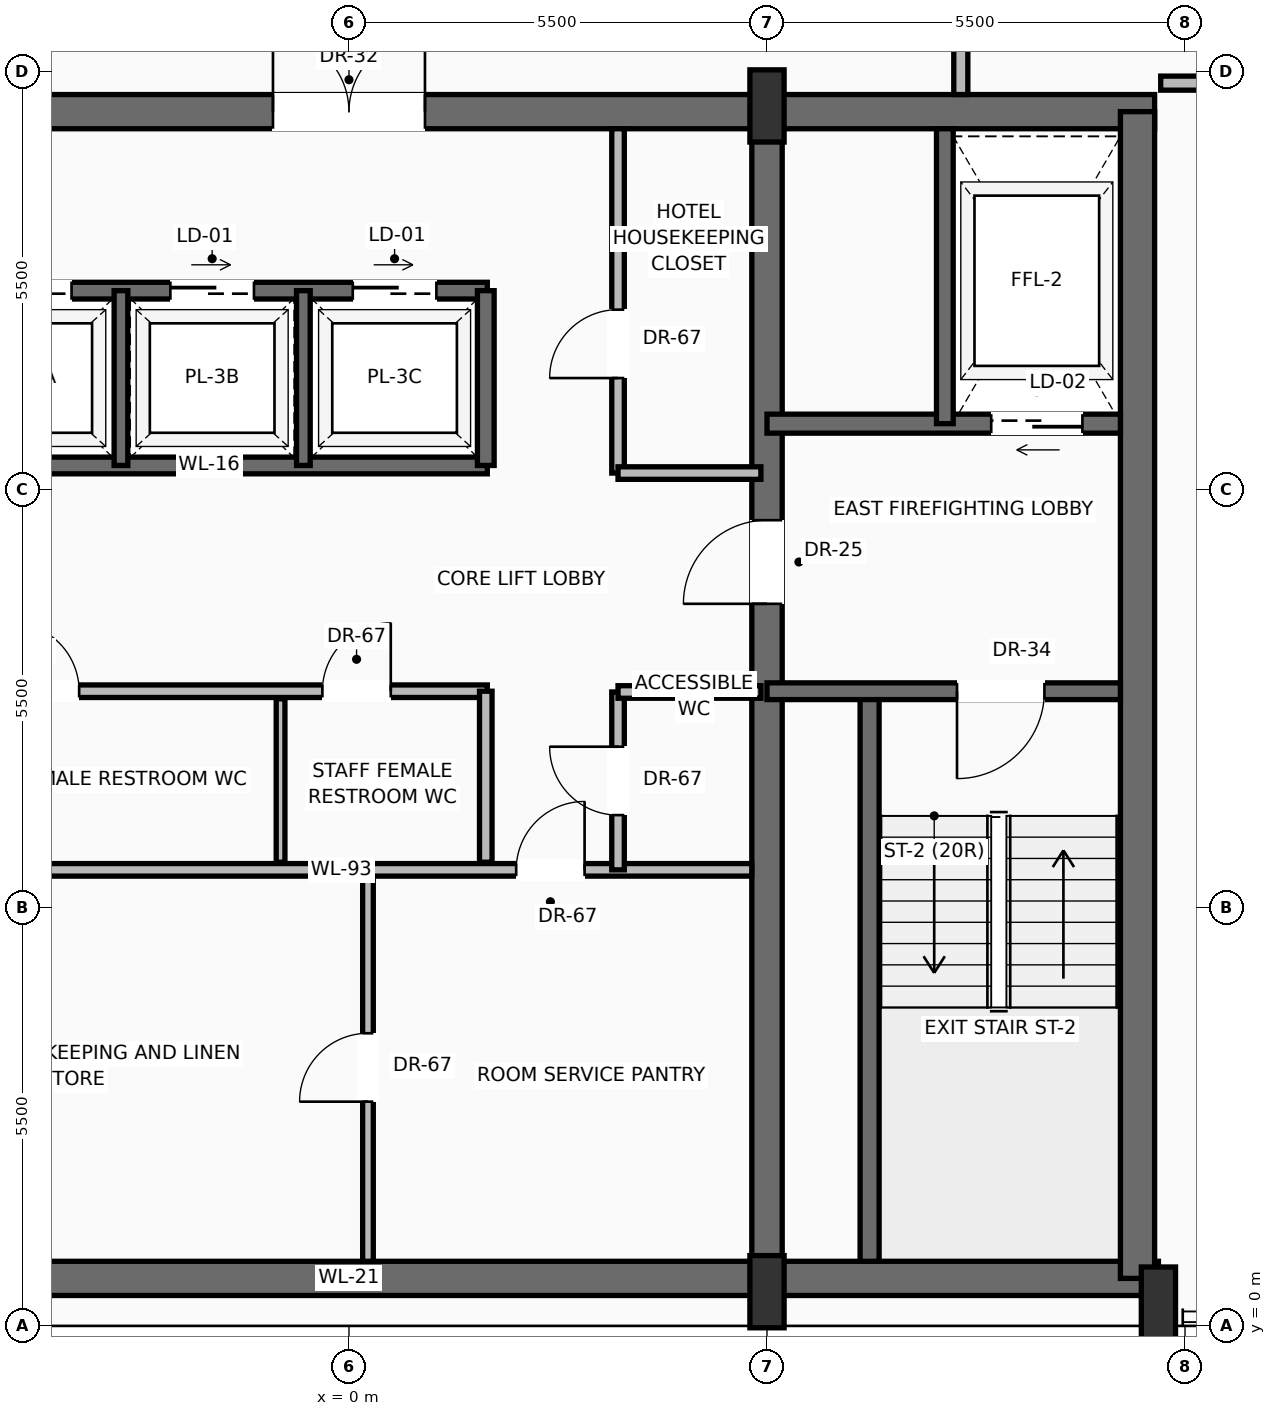
"""IFC4 building model, lengths in metres.
Left out: names, types, materials, properties, quantities, classifications, styles, units other than length and angle.
Written with IfcOpenShell. Run it as: python <this file> out.ifc"""

import sys

from ifc_helpers import new_model, si_unit, direction, frame, frame_2d, origin, origin_2d, place, context, subcontext, project, spatial, rectangle, extrude, source, transform, mapped, element, fill, save


model = new_model("IFC4")
c1 = context("Model", 3, precision=1e-05, world=origin(), true_north=direction((0.0, 1.0)))
c2 = subcontext(c1, "Body", "Model", "MODEL_VIEW")
j1 = project(units=[si_unit("LENGTHUNIT", "METRE"), si_unit("PLANEANGLEUNIT", "RADIAN")], contexts=[c1])
p1 = place(None, origin())
s1 = spatial("IfcSite", under=j1, at=p1, CompositionType="ELEMENT")
p2 = place(p1, origin())
s2 = spatial("IfcBuilding", under=s1, at=p2, CompositionType="ELEMENT")
p3 = place(p2, frame((0.0, 0.0, 273.0)))
s3 = spatial("IfcBuildingStorey", under=s2, at=p3, CompositionType="ELEMENT", Elevation=273.0)
p4 = place(p3, frame((-10.65, 0.625, 0.0), z_axis=(0.0, 0.0, 1.0), x_axis=(1.0, 0.0, 0.0)))
e1 = element("IfcWall", 1, at=p4, inside=s3, PredefinedType="SHEAR", context=c2, shape_type="SweptSolid", body=[
    extrude(rectangle(XDim=21.3, YDim=0.45, at=frame_2d((10.65, 0.0))), origin(), (0.0, 0.0, 1.0), 3.24),
])
p5 = place(p3, frame((-10.6, 15.975, 0.0), z_axis=(0.0, 0.0, 1.0), x_axis=(1.0, 0.0, 0.0)))
e2 = element("IfcWall", 2, at=p5, inside=s3, PredefinedType="SHEAR", context=c2, shape_type="SweptSolid", body=[
    extrude(rectangle(XDim=21.2, YDim=0.45, at=frame_2d((10.6, 0.0))), origin(), (0.0, 0.0, 1.0), 3.24),
])
p6 = place(p5, frame((3.17, 0.0, 0.0)))
e3 = element("IfcOpeningElement", 3, at=p6, cuts=e2, PredefinedType="OPENING", context=c2, shape_type="SweptSolid", body=[
    extrude(rectangle(XDim=1.3, YDim=2.3, at=frame_2d((0.65, 1.15))), frame((0.0, 0.235, 0.0), z_axis=(0.0, -1.0, 0.0), x_axis=(1.0, 0.0, 0.0)), (0.0, 0.0, 1.0), 0.47),
])
p7 = place(p5, frame((9.6, 0.0, 0.0)))
e4 = element("IfcOpeningElement", 4, at=p7, cuts=e2, PredefinedType="OPENING", context=c2, shape_type="SweptSolid", body=[
    extrude(rectangle(XDim=2.0, YDim=2.4, at=frame_2d((1.0, 1.2))), frame((0.0, 0.235, 0.0), z_axis=(0.0, -1.0, 0.0), x_axis=(1.0, 0.0, 0.0)), (0.0, 0.0, 1.0), 0.47),
])
p8 = place(p3, frame((10.375, 0.625, 0.0), z_axis=(0.0, 0.0, 1.0), x_axis=(0.0, 1.0, 0.0)))
e5 = element("IfcWall", 5, at=p8, inside=s3, PredefinedType="SHEAR", context=c2, shape_type="SweptSolid", body=[
    extrude(rectangle(XDim=15.35, YDim=0.45, at=frame_2d((7.675, 0.0))), origin(), (0.0, 0.0, 1.0), 3.24),
])
p9 = place(p3, frame((5.5, 0.625, 0.0), z_axis=(0.0, 0.0, 1.0), x_axis=(0.0, 1.0, 0.0)))
e6 = element("IfcWall", 6, at=p9, inside=s3, PredefinedType="SHEAR", context=c2, shape_type="SweptSolid", body=[
    extrude(rectangle(XDim=15.35, YDim=0.4, at=frame_2d((7.675, 0.0))), origin(), (0.0, 0.0, 1.0), 3.24),
])
p10 = place(p9, frame((8.875, 0.0, 0.0)))
e7 = element("IfcOpeningElement", 7, at=p10, cuts=e6, PredefinedType="OPENING", context=c2, shape_type="SweptSolid", body=[
    extrude(rectangle(XDim=1.1, YDim=2.2, at=frame_2d((0.55, 1.1))), frame((0.0, 0.21, 0.0), z_axis=(0.0, -1.0, 0.0), x_axis=(1.0, 0.0, 0.0)), (0.0, 0.0, 1.0), 0.42),
])
m1 = source(origin(), c2, "Body", "SweptSolid", [
    extrude(rectangle(XDim=0.45, YDim=0.95, at=origin_2d()), origin(), (0.0, 0.0, 1.0), 3.45),
])
for number, where, z_axis, x_axis in (
    (8, (5.5, 0.45, 0.0), (0.0, 0.0, 1.0), (1.0, 0.0, 0.0)),
    (9, (10.65, 0.3, 0.0), (0.0, 0.0, 1.0), (1.0, 0.0, 0.0)),
    (10, (5.5, 16.05, 0.0), (0.0, 0.0, 1.0), (1.0, 0.0, 0.0)),
):
    element("IfcColumn", number, at=place(p3, frame(where, z_axis=z_axis, x_axis=x_axis)), inside=s3, PredefinedType="PILASTER", context=c2, shape_type="MappedRepresentation", body=[
        mapped(m1, transform((0.0, 0.0, 0.0), scale=1.0)),
    ])
p11 = place(p3, frame((7.892, 31.777, 0.0), z_axis=(0.0, 0.0, 1.0), x_axis=(0.511386799139, -0.85935065117, 0.0)))
e11 = element("IfcWall", 11, at=p11, inside=s3, PredefinedType="SOLIDWALL", context=c2, shape_type="SweptSolid", body=[
    extrude(rectangle(XDim=19.989, YDim=0.28, at=frame_2d((9.994, 0.0))), origin(), (0.0, 0.0, 1.0), 2.82),
])
p12 = place(p11, frame((4.797, 0.0, 0.0)))
e12 = element("IfcOpeningElement", 12, at=p12, cuts=e11, PredefinedType="OPENING", context=c2, shape_type="SweptSolid", body=[
    extrude(rectangle(XDim=1.6, YDim=2.35, at=frame_2d((0.8, 1.175))), frame((0.0, 0.15, 0.0), z_axis=(0.0, -1.0, 0.0), x_axis=(1.0, 0.0, 0.0)), (0.0, 0.0, 1.0), 0.3),
])
p13 = place(p11, frame((13.592, 0.0, 0.9)))
e13 = element("IfcOpeningElement", 13, at=p13, cuts=e11, PredefinedType="OPENING", context=c2, shape_type="SweptSolid", body=[
    extrude(rectangle(XDim=1.55, YDim=1.75, at=frame_2d((0.775, 0.875))), frame((0.0, 0.15, 0.0), z_axis=(0.0, -1.0, 0.0), x_axis=(1.0, 0.0, 0.0)), (0.0, 0.0, 1.0), 0.3),
])
p14 = place(p3, frame((6.85, 0.85, 0.0), z_axis=(0.0, 0.0, 1.0), x_axis=(0.0, 1.0, 0.0)))
e14 = element("IfcWall", 14, at=p14, inside=s3, PredefinedType="SOLIDWALL", context=c2, shape_type="SweptSolid", body=[
    extrude(rectangle(XDim=7.5, YDim=0.25, at=frame_2d((3.75, 0.0))), origin(), (0.0, 0.0, 1.0), 3.24),
])
p15 = place(p3, frame((10.15, 8.35, 0.0), z_axis=(0.0, 0.0, 1.0), x_axis=(-1.0, 0.0, 0.0)))
e15 = element("IfcWall", 15, at=p15, inside=s3, PredefinedType="SOLIDWALL", context=c2, shape_type="SweptSolid", body=[
    extrude(rectangle(XDim=4.65, YDim=0.22, at=frame_2d((2.325, 0.0))), origin(), (0.0, 0.0, 1.0), 3.24),
])
p16 = place(p15, frame((1.0, 0.0, 0.0)))
e16 = element("IfcOpeningElement", 16, at=p16, cuts=e15, PredefinedType="OPENING", context=c2, shape_type="SweptSolid", body=[
    extrude(rectangle(XDim=1.15, YDim=2.2, at=frame_2d((0.575, 1.1))), frame((0.0, 0.12, 0.0), z_axis=(0.0, -1.0, 0.0), x_axis=(1.0, 0.0, 0.0)), (0.0, 0.0, 1.0), 0.24),
])
p17 = place(p3, frame((10.15, 11.87, 0.0), z_axis=(0.0, 0.0, 1.0), x_axis=(-1.0, 0.0, 0.0)))
e17 = element("IfcWall", 17, at=p17, inside=s3, PredefinedType="SOLIDWALL", context=c2, shape_type="SweptSolid", body=[
    extrude(rectangle(XDim=4.65, YDim=0.25, at=frame_2d((2.325, 0.0))), origin(), (0.0, 0.0, 1.0), 3.24),
])
p18 = place(p17, frame((0.5, 0.0, 0.0)))
e18 = element("IfcOpeningElement", 18, at=p18, cuts=e17, PredefinedType="OPENING", context=c2, shape_type="SweptSolid", body=[
    extrude(rectangle(XDim=1.2, YDim=2.25, at=frame_2d((0.6, 1.125))), frame((0.0, 0.135, 0.0), z_axis=(0.0, -1.0, 0.0), x_axis=(1.0, 0.0, 0.0)), (0.0, 0.0, 1.0), 0.27),
])
p19 = place(p3, frame((7.84, 11.87, 0.0), z_axis=(0.0, 0.0, 1.0), x_axis=(0.0, 1.0, 0.0)))
e19 = element("IfcWall", 19, at=p19, inside=s3, PredefinedType="SOLIDWALL", context=c2, shape_type="SweptSolid", body=[
    extrude(rectangle(XDim=3.88, YDim=0.22, at=frame_2d((1.94, 0.0))), origin(), (0.0, 0.0, 1.0), 3.24),
])
p20 = place(p3, frame((-5.5, 6.0, 0.0), z_axis=(0.0, 0.0, 1.0), x_axis=(1.0, 0.0, 0.0)))
e20 = element("IfcWall", 20, at=p20, inside=s3, PredefinedType="PARTITIONING", context=c2, shape_type="SweptSolid", body=[
    extrude(rectangle(XDim=10.8, YDim=0.165, at=frame_2d((5.4, 0.0))), origin(), (0.0, 0.0, 1.0), 3.232),
])
p21 = place(p20, frame((7.7, 0.0, 0.0)))
e21 = element("IfcOpeningElement", 21, at=p21, cuts=e20, PredefinedType="OPENING", context=c2, shape_type="SweptSolid", body=[
    extrude(rectangle(XDim=0.9, YDim=2.1, at=frame_2d((0.45, 1.05))), frame((0.0, 0.093, 0.0), z_axis=(0.0, -1.0, 0.0), x_axis=(1.0, 0.0, 0.0)), (0.0, 0.0, 1.0), 0.185),
])
p22 = place(p3, frame((0.25, 0.85, 0.0), z_axis=(0.0, 0.0, 1.0), x_axis=(0.0, 1.0, 0.0)))
e22 = element("IfcWall", 22, at=p22, inside=s3, PredefinedType="PARTITIONING", context=c2, shape_type="SweptSolid", body=[
    extrude(rectangle(XDim=5.03, YDim=0.14, at=frame_2d((2.515, 0.0))), origin(), (0.0, 0.0, 1.0), 3.232),
])
p23 = place(p22, frame((2.1, 0.0, 0.0)))
e23 = element("IfcOpeningElement", 23, at=p23, cuts=e22, PredefinedType="OPENING", context=c2, shape_type="SweptSolid", body=[
    extrude(rectangle(XDim=0.9, YDim=2.1, at=frame_2d((0.45, 1.05))), frame((0.0, 0.08, 0.0), z_axis=(0.0, -1.0, 0.0), x_axis=(1.0, 0.0, 0.0)), (0.0, 0.0, 1.0), 0.16),
])
p24 = place(p3, frame((3.54, 6.0, 0.0), z_axis=(0.0, 0.0, 1.0), x_axis=(0.0, 1.0, 0.0)))
e24 = element("IfcWall", 24, at=p24, inside=s3, PredefinedType="PARTITIONING", context=c2, shape_type="SweptSolid", body=[
    extrude(rectangle(XDim=2.34, YDim=0.165, at=frame_2d((1.17, 0.0))), origin(), (0.0, 0.0, 1.0), 3.232),
])
p25 = place(p24, frame((0.72, 0.0, 0.0)))
e25 = element("IfcOpeningElement", 25, at=p25, cuts=e24, PredefinedType="OPENING", context=c2, shape_type="SweptSolid", body=[
    extrude(rectangle(XDim=0.9, YDim=2.1, at=frame_2d((0.45, 1.05))), frame((0.0, 0.093, 0.0), z_axis=(0.0, -1.0, 0.0), x_axis=(1.0, 0.0, 0.0)), (0.0, 0.0, 1.0), 0.185),
])
p26 = place(p3, frame((3.54, 8.34, 0.0), z_axis=(0.0, 0.0, 1.0), x_axis=(1.0, 0.0, 0.0)))
e26 = element("IfcWall", 26, at=p26, inside=s3, PredefinedType="PARTITIONING", context=c2, shape_type="SweptSolid", body=[
    extrude(rectangle(XDim=1.88, YDim=0.165, at=frame_2d((0.94, 0.0))), origin(), (0.0, 0.0, 1.0), 3.232),
])
p27 = place(p3, frame((-5.3, 8.35, 0.0), z_axis=(0.0, 0.0, 1.0), x_axis=(1.0, 0.0, 0.0)))
e27 = element("IfcWall", 27, at=p27, inside=s3, PredefinedType="PARTITIONING", context=c2, shape_type="SweptSolid", body=[
    extrude(rectangle(XDim=7.12, YDim=0.165, at=frame_2d((3.56, 0.0))), origin(), (0.0, 0.0, 1.0), 3.232),
])
p28 = place(p27, frame((0.85, 0.0, 0.0)))
e28 = element("IfcOpeningElement", 28, at=p28, cuts=e27, PredefinedType="OPENING", context=c2, shape_type="SweptSolid", body=[
    extrude(rectangle(XDim=0.9, YDim=2.1, at=frame_2d((0.45, 1.05))), frame((0.0, 0.093, 0.0), z_axis=(0.0, -1.0, 0.0), x_axis=(1.0, 0.0, 0.0)), (0.0, 0.0, 1.0), 0.185),
])
p29 = place(p27, frame((4.95, 0.0, 0.0)))
e29 = element("IfcOpeningElement", 29, at=p29, cuts=e27, PredefinedType="OPENING", context=c2, shape_type="SweptSolid", body=[
    extrude(rectangle(XDim=0.9, YDim=2.1, at=frame_2d((0.45, 1.05))), frame((0.0, 0.093, 0.0), z_axis=(0.0, -1.0, 0.0), x_axis=(1.0, 0.0, 0.0)), (0.0, 0.0, 1.0), 0.185),
])
p30 = place(p3, frame((1.8, 6.1, 0.0), z_axis=(0.0, 0.0, 1.0), x_axis=(0.0, 1.0, 0.0)))
e30 = element("IfcWall", 30, at=p30, inside=s3, PredefinedType="PARTITIONING", context=c2, shape_type="SweptSolid", body=[
    extrude(rectangle(XDim=2.25, YDim=0.165, at=frame_2d((1.125, 0.0))), origin(), (0.0, 0.0, 1.0), 3.232),
])
p31 = place(p3, frame((-0.9, 6.1, 0.0), z_axis=(0.0, 0.0, 1.0), x_axis=(0.0, 1.0, 0.0)))
e31 = element("IfcWall", 31, at=p31, inside=s3, PredefinedType="PARTITIONING", context=c2, shape_type="SweptSolid", body=[
    extrude(rectangle(XDim=2.15, YDim=0.115, at=frame_2d((1.075, 0.0))), origin(), (0.0, 0.0, 1.0), 3.232),
])
p32 = place(p3, frame((-5.5, 11.32, 0.0), z_axis=(0.0, 0.0, 1.0), x_axis=(1.0, 0.0, 0.0)))
e32 = element("IfcWall", 32, at=p32, inside=s3, PredefinedType="SOLIDWALL", context=c2, shape_type="SweptSolid", body=[
    extrude(rectangle(XDim=7.32, YDim=0.22, at=frame_2d((3.66, 0.0))), origin(), (0.0, 0.0, 1.0), 3.24),
])
p33 = place(p3, frame((-5.5, 13.62, 0.0), z_axis=(0.0, 0.0, 1.0), x_axis=(1.0, 0.0, 0.0)))
e33 = element("IfcWall", 33, at=p33, inside=s3, PredefinedType="SOLIDWALL", context=c2, shape_type="SweptSolid", body=[
    extrude(rectangle(XDim=7.32, YDim=0.22, at=frame_2d((3.66, 0.0))), origin(), (0.0, 0.0, 1.0), 3.24),
])
p34 = place(p33, frame((0.75, 0.0, 0.0)))
e34 = element("IfcOpeningElement", 34, at=p34, cuts=e33, PredefinedType="OPENING", context=c2, shape_type="SweptSolid", body=[
    extrude(rectangle(XDim=1.1, YDim=2.2, at=frame_2d((0.55, 1.1))), frame((0.0, 0.12, 0.0), z_axis=(0.0, -1.0, 0.0), x_axis=(1.0, 0.0, 0.0)), (0.0, 0.0, 1.0), 0.24),
])
p35 = place(p33, frame((3.15, 0.0, 0.0)))
e35 = element("IfcOpeningElement", 35, at=p35, cuts=e33, PredefinedType="OPENING", context=c2, shape_type="SweptSolid", body=[
    extrude(rectangle(XDim=1.1, YDim=2.2, at=frame_2d((0.55, 1.1))), frame((0.0, 0.12, 0.0), z_axis=(0.0, -1.0, 0.0), x_axis=(1.0, 0.0, 0.0)), (0.0, 0.0, 1.0), 0.24),
])
p36 = place(p33, frame((5.55, 0.0, 0.0)))
e36 = element("IfcOpeningElement", 36, at=p36, cuts=e33, PredefinedType="OPENING", context=c2, shape_type="SweptSolid", body=[
    extrude(rectangle(XDim=1.1, YDim=2.2, at=frame_2d((0.55, 1.1))), frame((0.0, 0.12, 0.0), z_axis=(0.0, -1.0, 0.0), x_axis=(1.0, 0.0, 0.0)), (0.0, 0.0, 1.0), 0.24),
])
p37 = place(p3, frame((1.8, 11.32, 0.0), z_axis=(0.0, 0.0, 1.0), x_axis=(0.0, 1.0, 0.0)))
e37 = element("IfcWall", 37, at=p37, inside=s3, PredefinedType="SOLIDWALL", context=c2, shape_type="SweptSolid", body=[
    extrude(rectangle(XDim=2.3, YDim=0.22, at=frame_2d((1.15, 0.0))), origin(), (0.0, 0.0, 1.0), 3.24),
])
for number, where, z_axis, x_axis in (
    (38, (-3.0, 11.32, 0.0), (0.0, 0.0, 1.0), (0.0, 1.0, 0.0)),
    (39, (-0.6, 11.32, 0.0), (0.0, 0.0, 1.0), (0.0, 1.0, 0.0)),
):
    element("IfcWall", number, at=place(p3, frame(where, z_axis=z_axis, x_axis=x_axis)), inside=s3, PredefinedType="SOLIDWALL", context=c2, shape_type="SweptSolid", body=[
        extrude(rectangle(XDim=2.3, YDim=0.18, at=frame_2d((1.15, 0.0))), origin(), (0.0, 0.0, 1.0), 3.24),
    ])
p38 = place(p3, frame((3.54, 11.22, 0.0), z_axis=(0.0, 0.0, 1.0), x_axis=(0.0, 1.0, 0.0)))
e40 = element("IfcWall", 40, at=p38, inside=s3, PredefinedType="PARTITIONING", context=c2, shape_type="SweptSolid", body=[
    extrude(rectangle(XDim=4.53, YDim=0.165, at=frame_2d((2.265, 0.0))), origin(), (0.0, 0.0, 1.0), 3.232),
])
p39 = place(p38, frame((1.25, 0.0, 0.0)))
e41 = element("IfcOpeningElement", 41, at=p39, cuts=e40, PredefinedType="OPENING", context=c2, shape_type="SweptSolid", body=[
    extrude(rectangle(XDim=0.9, YDim=2.1, at=frame_2d((0.45, 1.05))), frame((0.0, 0.093, 0.0), z_axis=(0.0, -1.0, 0.0), x_axis=(1.0, 0.0, 0.0)), (0.0, 0.0, 1.0), 0.185),
])
p40 = place(p3, frame((3.54, 11.22, 0.0), z_axis=(0.0, 0.0, 1.0), x_axis=(1.0, 0.0, 0.0)))
e42 = element("IfcWall", 42, at=p40, inside=s3, PredefinedType="PARTITIONING", context=c2, shape_type="SweptSolid", body=[
    extrude(rectangle(XDim=1.88, YDim=0.165, at=frame_2d((0.94, 0.0))), origin(), (0.0, 0.0, 1.0), 3.232),
])
p41 = place(p3, frame((8.05, 16.2, 0.0), z_axis=(0.0, 0.0, 1.0), x_axis=(0.0, 1.0, 0.0)))
e43 = element("IfcWall", 43, at=p41, inside=s3, PredefinedType="PARTITIONING", context=c2, shape_type="SweptSolid", body=[
    extrude(rectangle(XDim=13.8, YDim=0.185, at=frame_2d((6.9, 0.0))), origin(), (0.0, 0.0, 1.0), 3.232),
])
p42 = place(p41, frame((3.238, 0.0, 0.0)))
e44 = element("IfcOpeningElement", 44, at=p42, cuts=e43, PredefinedType="OPENING", context=c2, shape_type="SweptSolid", body=[
    extrude(rectangle(XDim=1.05, YDim=2.25, at=frame_2d((0.525, 1.125))), frame((0.0, 0.103, 0.0), z_axis=(0.0, -1.0, 0.0), x_axis=(1.0, 0.0, 0.0)), (0.0, 0.0, 1.0), 0.205),
])
p43 = place(p3, frame((10.68, 16.35, 0.0), z_axis=(0.0, 0.0, 1.0), x_axis=(1.0, 0.0, 0.0)))
e45 = element("IfcWall", 45, at=p43, inside=s3, PredefinedType="PARTITIONING", context=c2, shape_type="SweptSolid", body=[
    extrude(rectangle(XDim=6.543, YDim=0.185, at=frame_2d((3.271, 0.0))), origin(), (0.0, 0.0, 1.0), 3.232),
])
p44 = place(p43, frame((1.867, 0.0, 0.0)))
e46 = element("IfcOpeningElement", 46, at=p44, cuts=e45, PredefinedType="OPENING", context=c2, shape_type="SweptSolid", body=[
    extrude(rectangle(XDim=1.05, YDim=2.25, at=frame_2d((0.525, 1.125))), frame((0.0, 0.103, 0.0), z_axis=(0.0, -1.0, 0.0), x_axis=(1.0, 0.0, 0.0)), (0.0, 0.0, 1.0), 0.205),
])
m2 = source(origin(), c2, "Body", "SweptSolid", [
    extrude(rectangle(XDim=1.15, YDim=2.2, at=frame_2d((0.575, 1.1))), frame((0.0, 0.025, 0.0), z_axis=(0.0, -1.0, 0.0), x_axis=(1.0, 0.0, 0.0)), (0.0, 0.0, 1.0), 0.05),
])
p45 = place(p16, origin())
e47 = element("IfcDoor", 47, at=p45, inside=s3, OperationType="SINGLE_SWING_RIGHT", PredefinedType="DOOR", context=c2, shape_type="MappedRepresentation", body=[
    mapped(m2, transform((0.0, 0.0, 0.0), scale=1.0)),
])
fill(e16, e47)
m3 = source(origin(), c2, "Body", "SweptSolid", [
    extrude(rectangle(XDim=1.1, YDim=2.2, at=frame_2d((0.55, 1.1))), frame((0.0, 0.025, 0.0), z_axis=(0.0, -1.0, 0.0), x_axis=(1.0, 0.0, 0.0)), (0.0, 0.0, 1.0), 0.05),
])
p46 = place(p10, origin())
e48 = element("IfcDoor", 48, at=p46, inside=s3, OperationType="SINGLE_SWING_LEFT", PredefinedType="DOOR", context=c2, shape_type="MappedRepresentation", body=[
    mapped(m3, transform((0.0, 0.0, 0.0), scale=1.0)),
])
fill(e7, e48)
m4 = source(origin(), c2, "Body", "SweptSolid", [
    extrude(rectangle(XDim=1.2, YDim=2.25, at=frame_2d((0.6, 1.125))), frame((0.0, 0.025, 0.0), z_axis=(0.0, -1.0, 0.0), x_axis=(1.0, 0.0, 0.0)), (0.0, 0.0, 1.0), 0.05),
])
p47 = place(p18, origin())
e49 = element("IfcDoor", 49, at=p47, inside=s3, OperationType="SLIDING_TO_RIGHT", PredefinedType="DOOR", context=c2, shape_type="MappedRepresentation", body=[
    mapped(m4, transform((0.0, 0.0, 0.0), scale=1.0)),
])
fill(e18, e49)
m5 = source(origin(), c2, "Body", "SweptSolid", [
    extrude(rectangle(XDim=2.0, YDim=2.4, at=frame_2d((1.0, 1.2))), frame((0.0, 0.025, 0.0), z_axis=(0.0, -1.0, 0.0), x_axis=(1.0, 0.0, 0.0)), (0.0, 0.0, 1.0), 0.05),
])
p48 = place(p7, origin())
e50 = element("IfcDoor", 50, at=p48, inside=s3, OperationType="DOUBLE_DOOR_SINGLE_SWING", PredefinedType="DOOR", context=c2, shape_type="MappedRepresentation", body=[
    mapped(m5, transform((0.0, 0.0, 0.0), scale=1.0)),
])
fill(e4, e50)
m6 = source(origin(), c2, "Body", "SweptSolid", [
    extrude(rectangle(XDim=0.9, YDim=2.1, at=frame_2d((0.45, 1.05))), frame((0.0, 0.025, 0.0), z_axis=(0.0, -1.0, 0.0), x_axis=(1.0, 0.0, 0.0)), (0.0, 0.0, 1.0), 0.05),
])
p49 = place(p21, origin())
e51 = element("IfcDoor", 51, at=p49, inside=s3, OperationType="SINGLE_SWING_RIGHT", PredefinedType="DOOR", context=c2, shape_type="MappedRepresentation", body=[
    mapped(m6, transform((0.0, 0.0, 0.0), scale=1.0)),
])
fill(e21, e51)
p50 = place(p23, origin())
e52 = element("IfcDoor", 52, at=p50, inside=s3, OperationType="SINGLE_SWING_LEFT", PredefinedType="DOOR", context=c2, shape_type="MappedRepresentation", body=[
    mapped(m6, transform((0.0, 0.0, 0.0), scale=1.0)),
])
fill(e23, e52)
p51 = place(p25, origin())
e53 = element("IfcDoor", 53, at=p51, inside=s3, OperationType="SINGLE_SWING_RIGHT", PredefinedType="DOOR", context=c2, shape_type="MappedRepresentation", body=[
    mapped(m6, transform((0.0, 0.0, 0.0), scale=1.0)),
])
fill(e25, e53)
p52 = place(p28, origin())
e54 = element("IfcDoor", 54, at=p52, inside=s3, OperationType="SINGLE_SWING_LEFT", PredefinedType="DOOR", context=c2, shape_type="MappedRepresentation", body=[
    mapped(m6, transform((0.0, 0.0, 0.0), scale=1.0)),
])
fill(e28, e54)
p53 = place(p29, origin())
e55 = element("IfcDoor", 55, at=p53, inside=s3, OperationType="SINGLE_SWING_RIGHT", PredefinedType="DOOR", context=c2, shape_type="MappedRepresentation", body=[
    mapped(m6, transform((0.0, 0.0, 0.0), scale=1.0)),
])
fill(e29, e55)
m7 = source(origin(), c2, "Body", "SweptSolid", [
    extrude(rectangle(XDim=1.1, YDim=2.2, at=frame_2d((0.55, 1.1))), frame((0.0, 0.025, 0.0), z_axis=(0.0, -1.0, 0.0), x_axis=(1.0, 0.0, 0.0)), (0.0, 0.0, 1.0), 0.05),
])
p54 = place(p34, origin())
e56 = element("IfcDoor", 56, at=p54, inside=s3, OperationType="SLIDING_TO_RIGHT", PredefinedType="DOOR", context=c2, shape_type="MappedRepresentation", body=[
    mapped(m7, transform((0.0, 0.0, 0.0), scale=1.0)),
])
fill(e34, e56)
p55 = place(p35, origin())
e57 = element("IfcDoor", 57, at=p55, inside=s3, OperationType="SLIDING_TO_RIGHT", PredefinedType="DOOR", context=c2, shape_type="MappedRepresentation", body=[
    mapped(m7, transform((0.0, 0.0, 0.0), scale=1.0)),
])
fill(e35, e57)
p56 = place(p36, origin())
e58 = element("IfcDoor", 58, at=p56, inside=s3, OperationType="SLIDING_TO_RIGHT", PredefinedType="DOOR", context=c2, shape_type="MappedRepresentation", body=[
    mapped(m7, transform((0.0, 0.0, 0.0), scale=1.0)),
])
fill(e36, e58)
p57 = place(p39, origin())
e59 = element("IfcDoor", 59, at=p57, inside=s3, OperationType="SINGLE_SWING_LEFT", PredefinedType="DOOR", context=c2, shape_type="MappedRepresentation", body=[
    mapped(m6, transform((0.0, 0.0, 0.0), scale=1.0)),
])
fill(e41, e59)
save(model, sys.argv[1])
